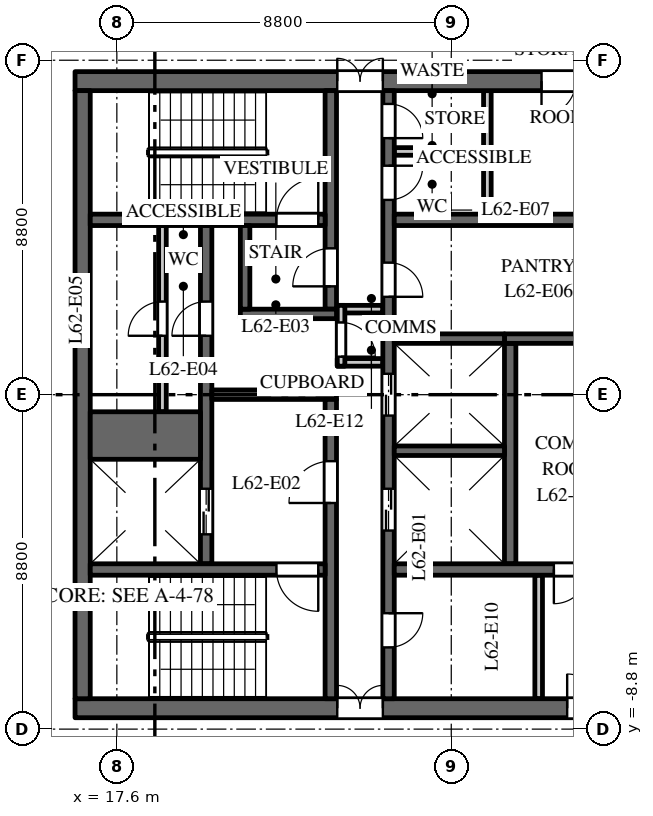
"""IFC4 building model, lengths in metres.
Left out: names, types, materials, properties, quantities, classifications, styles, units other than length and angle.
Written with IfcOpenShell. Run it as: python <this file> out.ifc"""

import sys

from ifc_helpers import new_model, si_unit, direction, frame, frame_2d, origin, place, context, subcontext, project, spatial, rectangle, extrude, element, fill, save


model = new_model("IFC4")
c1 = context("Model", 3, precision=1e-05, world=origin(), true_north=direction((0.0, 1.0)))
c2 = subcontext(c1, "Body", "Model", "MODEL_VIEW")
j1 = project(units=[si_unit("LENGTHUNIT", "METRE"), si_unit("PLANEANGLEUNIT", "RADIAN")], contexts=[c1])
p1 = place(None, origin())
s1 = spatial("IfcSite", under=j1, at=p1, CompositionType="ELEMENT")
p2 = place(p1, origin())
s2 = spatial("IfcBuilding", under=s1, at=p2, CompositionType="ELEMENT")
p3 = place(p2, frame((0.0, 0.0, 291.0)))
s3 = spatial("IfcBuildingStorey", under=s2, at=p3, CompositionType="ELEMENT", Elevation=291.0)
p4 = place(p3, frame((16.5, 8.25, 0.0), z_axis=(0.0, 0.0, 1.0), x_axis=(1.0, 0.0, 0.0)))
e1 = element("IfcWall", 1, at=p4, inside=s3, PredefinedType="SHEAR", context=c2, shape_type="SweptSolid", body=[
    extrude(rectangle(XDim=15.0, YDim=0.5, at=frame_2d((7.5, 0.0))), origin(), (0.0, 0.0, 1.0), 3.7),
])
p5 = place(p4, frame((6.9, 0.0, 0.0)))
e2 = element("IfcOpeningElement", 2, at=p5, cuts=e1, PredefinedType="OPENING", context=c2, shape_type="SweptSolid", body=[
    extrude(rectangle(XDim=1.2, YDim=2.1, at=frame_2d((0.6, 1.05))), frame((0.0, 0.26, 0.0), z_axis=(0.0, -1.0, 0.0), x_axis=(1.0, 0.0, 0.0)), (0.0, 0.0, 1.0), 0.52),
])
p6 = place(p4, frame((12.275, 0.0, 0.0)))
e3 = element("IfcOpeningElement", 3, at=p6, cuts=e1, PredefinedType="OPENING", context=c2, shape_type="SweptSolid", body=[
    extrude(rectangle(XDim=0.9, YDim=2.1, at=frame_2d((0.45, 1.05))), frame((0.0, 0.26, 0.0), z_axis=(0.0, -1.0, 0.0), x_axis=(1.0, 0.0, 0.0)), (0.0, 0.0, 1.0), 0.52),
])
p7 = place(p3, frame((16.5, -8.25, 0.0), z_axis=(0.0, 0.0, 1.0), x_axis=(1.0, 0.0, 0.0)))
e4 = element("IfcWall", 4, at=p7, inside=s3, PredefinedType="SHEAR", context=c2, shape_type="SweptSolid", body=[
    extrude(rectangle(XDim=15.0, YDim=0.5, at=frame_2d((7.5, 0.0))), origin(), (0.0, 0.0, 1.0), 3.7),
])
p8 = place(p7, frame((6.9, 0.0, 0.0)))
e5 = element("IfcOpeningElement", 5, at=p8, cuts=e4, PredefinedType="OPENING", context=c2, shape_type="SweptSolid", body=[
    extrude(rectangle(XDim=1.2, YDim=2.1, at=frame_2d((0.6, 1.05))), frame((0.0, 0.26, 0.0), z_axis=(0.0, -1.0, 0.0), x_axis=(1.0, 0.0, 0.0)), (0.0, 0.0, 1.0), 0.52),
])
p9 = place(p7, frame((12.95, 0.0, 0.0)))
e6 = element("IfcOpeningElement", 6, at=p9, cuts=e4, PredefinedType="OPENING", context=c2, shape_type="SweptSolid", body=[
    extrude(rectangle(XDim=0.9, YDim=2.1, at=frame_2d((0.45, 1.05))), frame((0.0, 0.26, 0.0), z_axis=(0.0, -1.0, 0.0), x_axis=(1.0, 0.0, 0.0)), (0.0, 0.0, 1.0), 0.52),
])
p10 = place(p3, frame((18.8, -0.45, 0.0), z_axis=(0.0, 0.0, 1.0), x_axis=(0.0, 1.0, 0.0)))
e7 = element("IfcWall", 7, at=p10, inside=s3, PredefinedType="PARTITIONING", context=c2, shape_type="SweptSolid", body=[
    extrude(rectangle(XDim=4.9, YDim=0.2, at=frame_2d((2.45, 0.0))), origin(), (0.0, 0.0, 1.0), 3.7),
])
p11 = place(p10, frame((2.0, 0.0, 0.0)))
e8 = element("IfcOpeningElement", 8, at=p11, cuts=e7, PredefinedType="OPENING", context=c2, shape_type="SweptSolid", body=[
    extrude(rectangle(XDim=0.9, YDim=2.1, at=frame_2d((0.45, 1.05))), frame((0.0, 0.11, 0.0), z_axis=(0.0, -1.0, 0.0), x_axis=(1.0, 0.0, 0.0)), (0.0, 0.0, 1.0), 0.22),
])
p12 = place(p3, frame((27.95, -4.45, 0.0), z_axis=(0.0, 0.0, 1.0), x_axis=(0.0, 1.0, 0.0)))
e9 = element("IfcWall", 9, at=p12, inside=s3, PredefinedType="SHEAR", context=c2, shape_type="SweptSolid", body=[
    extrude(rectangle(XDim=5.8, YDim=0.3, at=frame_2d((2.9, 0.0))), origin(), (0.0, 0.0, 1.0), 3.7),
])
p13 = place(p3, frame((27.8, 1.475, 0.0), z_axis=(0.0, 0.0, 1.0), x_axis=(1.0, 0.0, 0.0)))
e10 = element("IfcWall", 10, at=p13, inside=s3, PredefinedType="SHEAR", context=c2, shape_type="SweptSolid", body=[
    extrude(rectangle(XDim=3.2, YDim=0.25, at=frame_2d((1.6, 0.0))), origin(), (0.0, 0.0, 1.0), 3.7),
])
p14 = place(p3, frame((19.95, -4.45, 0.0), z_axis=(0.0, 0.0, 1.0), x_axis=(0.0, 1.0, 0.0)))
e11 = element("IfcWall", 11, at=p14, inside=s3, PredefinedType="SHEAR", context=c2, shape_type="SweptSolid", body=[
    extrude(rectangle(XDim=8.9, YDim=0.3, at=frame_2d((4.45, 0.0))), origin(), (0.0, 0.0, 1.0), 3.7),
])
p15 = place(p14, frame((0.775, 0.0, 0.0)))
e12 = element("IfcOpeningElement", 12, at=p15, cuts=e11, PredefinedType="OPENING", context=c2, shape_type="SweptSolid", body=[
    extrude(rectangle(XDim=1.2, YDim=2.1, at=frame_2d((0.6, 1.05))), frame((0.0, 0.16, 0.0), z_axis=(0.0, -1.0, 0.0), x_axis=(1.0, 0.0, 0.0)), (0.0, 0.0, 1.0), 0.32),
])
p16 = place(p14, frame((6.0, 0.0, 0.0)))
e13 = element("IfcOpeningElement", 13, at=p16, cuts=e11, PredefinedType="OPENING", context=c2, shape_type="SweptSolid", body=[
    extrude(rectangle(XDim=0.9, YDim=2.1, at=frame_2d((0.45, 1.05))), frame((0.0, 0.16, 0.0), z_axis=(0.0, -1.0, 0.0), x_axis=(1.0, 0.0, 0.0)), (0.0, 0.0, 1.0), 0.32),
])
p17 = place(p3, frame((24.75, -8.0, 0.0), z_axis=(0.0, 0.0, 1.0), x_axis=(0.0, 1.0, 0.0)))
e14 = element("IfcWall", 14, at=p17, inside=s3, PredefinedType="SHEAR", context=c2, shape_type="SweptSolid", body=[
    extrude(rectangle(XDim=16.0, YDim=0.3, at=frame_2d((8.0, 0.0))), origin(), (0.0, 0.0, 1.0), 3.7),
])
p18 = place(p17, frame((4.425, 0.0, 0.0)))
e15 = element("IfcOpeningElement", 15, at=p18, cuts=e14, PredefinedType="OPENING", context=c2, shape_type="SweptSolid", body=[
    extrude(rectangle(XDim=1.1, YDim=2.1, at=frame_2d((0.55, 1.05))), frame((0.0, 0.16, 0.0), z_axis=(0.0, -1.0, 0.0), x_axis=(1.0, 0.0, 0.0)), (0.0, 0.0, 1.0), 0.32),
])
p19 = place(p17, frame((7.45, 0.0, 0.0)))
e16 = element("IfcOpeningElement", 16, at=p19, cuts=e14, PredefinedType="OPENING", context=c2, shape_type="SweptSolid", body=[
    extrude(rectangle(XDim=1.1, YDim=2.1, at=frame_2d((0.55, 1.05))), frame((0.0, 0.16, 0.0), z_axis=(0.0, -1.0, 0.0), x_axis=(1.0, 0.0, 0.0)), (0.0, 0.0, 1.0), 0.32),
])
p20 = place(p17, frame((10.575, 0.0, 0.0)))
e17 = element("IfcOpeningElement", 17, at=p20, cuts=e14, PredefinedType="OPENING", context=c2, shape_type="SweptSolid", body=[
    extrude(rectangle(XDim=0.9, YDim=2.1, at=frame_2d((0.45, 1.05))), frame((0.0, 0.16, 0.0), z_axis=(0.0, -1.0, 0.0), x_axis=(1.0, 0.0, 0.0)), (0.0, 0.0, 1.0), 0.32),
])
p21 = place(p17, frame((13.125, 0.0, 0.0)))
e18 = element("IfcOpeningElement", 18, at=p21, cuts=e14, PredefinedType="OPENING", context=c2, shape_type="SweptSolid", body=[
    extrude(rectangle(XDim=0.9, YDim=2.1, at=frame_2d((0.45, 1.05))), frame((0.0, 0.16, 0.0), z_axis=(0.0, -1.0, 0.0), x_axis=(1.0, 0.0, 0.0)), (0.0, 0.0, 1.0), 0.32),
])
p22 = place(p17, frame((14.75, 0.0, 0.0)))
e19 = element("IfcOpeningElement", 19, at=p22, cuts=e14, PredefinedType="OPENING", context=c2, shape_type="SweptSolid", body=[
    extrude(rectangle(XDim=0.9, YDim=2.1, at=frame_2d((0.45, 1.05))), frame((0.0, 0.16, 0.0), z_axis=(0.0, -1.0, 0.0), x_axis=(1.0, 0.0, 0.0)), (0.0, 0.0, 1.0), 0.32),
])
p23 = place(p17, frame((1.35, 0.0, 0.0)))
e20 = element("IfcOpeningElement", 20, at=p23, cuts=e14, PredefinedType="OPENING", context=c2, shape_type="SweptSolid", body=[
    extrude(rectangle(XDim=0.9, YDim=2.1, at=frame_2d((0.45, 1.05))), frame((0.0, 0.16, 0.0), z_axis=(0.0, -1.0, 0.0), x_axis=(1.0, 0.0, 0.0)), (0.0, 0.0, 1.0), 0.32),
])
p24 = place(p3, frame((20.1, 0.0, 0.0), z_axis=(0.0, 0.0, 1.0), x_axis=(1.0, 0.0, 0.0)))
e21 = element("IfcWall", 21, at=p24, inside=s3, PredefinedType="SHEAR", context=c2, shape_type="SweptSolid", body=[
    extrude(rectangle(XDim=3.28, YDim=0.25, at=frame_2d((1.64, 0.0))), origin(), (0.0, 0.0, 1.0), 3.7),
])
p25 = place(p3, frame((16.7, -8.0, 0.0), z_axis=(0.0, 0.0, 1.0), x_axis=(0.0, 1.0, 0.0)))
e22 = element("IfcWall", 22, at=p25, inside=s3, PredefinedType="SHEAR", context=c2, shape_type="SweptSolid", body=[
    extrude(rectangle(XDim=16.0, YDim=0.4, at=frame_2d((8.0, 0.0))), origin(), (0.0, 0.0, 1.0), 3.7),
])
for number, where, z_axis, x_axis in (
    (23, (23.4, 0.85, 0.0), (0.0, 0.0, 1.0), (1.0, 0.0, 0.0)),
    (24, (23.4, 2.25, 0.0), (0.0, 0.0, 1.0), (1.0, 0.0, 0.0)),
):
    element("IfcWall", number, at=place(p3, frame(where, z_axis=z_axis, x_axis=x_axis)), inside=s3, PredefinedType="PARTITIONING", context=c2, shape_type="SweptSolid", body=[
        extrude(rectangle(XDim=1.2, YDim=0.2, at=frame_2d((0.6, 0.0))), origin(), (0.0, 0.0, 1.0), 3.7),
    ])
p26 = place(p3, frame((23.5, 0.75, 0.0), z_axis=(0.0, 0.0, 1.0), x_axis=(0.0, 1.0, 0.0)))
e25 = element("IfcWall", 25, at=p26, inside=s3, PredefinedType="PARTITIONING", context=c2, shape_type="SweptSolid", body=[
    extrude(rectangle(XDim=1.6, YDim=0.2, at=frame_2d((0.8, 0.0))), origin(), (0.0, 0.0, 1.0), 3.7),
])
p27 = place(p26, frame((0.25, 0.0, 0.0)))
e26 = element("IfcOpeningElement", 26, at=p27, cuts=e25, PredefinedType="OPENING", context=c2, shape_type="SweptSolid", body=[
    extrude(rectangle(XDim=0.9, YDim=2.1, at=frame_2d((0.45, 1.05))), frame((0.0, 0.11, 0.0), z_axis=(0.0, -1.0, 0.0), x_axis=(1.0, 0.0, 0.0)), (0.0, 0.0, 1.0), 0.22),
])
p28 = place(p3, frame((24.9, 4.6, 0.0), z_axis=(0.0, 0.0, 1.0), x_axis=(1.0, 0.0, 0.0)))
e27 = element("IfcWall", 27, at=p28, inside=s3, PredefinedType="SHEAR", context=c2, shape_type="SweptSolid", body=[
    extrude(rectangle(XDim=6.1, YDim=0.3, at=frame_2d((3.05, 0.0))), origin(), (0.0, 0.0, 1.0), 3.7),
])
for number, where, z_axis, x_axis in (
    (28, (27.35, 4.75, 0.0), (0.0, 0.0, 1.0), (0.0, 1.0, 0.0)),
    (29, (28.7, -8.0, 0.0), (0.0, 0.0, 1.0), (0.0, 1.0, 0.0)),
):
    element("IfcWall", number, at=place(p3, frame(where, z_axis=z_axis, x_axis=x_axis)), inside=s3, PredefinedType="PARTITIONING", context=c2, shape_type="SweptSolid", body=[
        extrude(rectangle(XDim=3.25, YDim=0.2, at=frame_2d((1.625, 0.0))), origin(), (0.0, 0.0, 1.0), 3.7),
    ])
p29 = place(p3, frame((24.9, 6.4, 0.0), z_axis=(0.0, 0.0, 1.0), x_axis=(1.0, 0.0, 0.0)))
e30 = element("IfcWall", 30, at=p29, inside=s3, PredefinedType="PARTITIONING", context=c2, shape_type="SweptSolid", body=[
    extrude(rectangle(XDim=2.35, YDim=0.2, at=frame_2d((1.175, 0.0))), origin(), (0.0, 0.0, 1.0), 3.7),
])
p30 = place(p3, frame((24.9, -4.6, 0.0), z_axis=(0.0, 0.0, 1.0), x_axis=(1.0, 0.0, 0.0)))
e31 = element("IfcWall", 31, at=p30, inside=s3, PredefinedType="SHEAR", context=c2, shape_type="SweptSolid", body=[
    extrude(rectangle(XDim=6.1, YDim=0.3, at=frame_2d((3.05, 0.0))), origin(), (0.0, 0.0, 1.0), 3.7),
])
p31 = place(p30, frame((4.2, 0.0, 0.0)))
e32 = element("IfcOpeningElement", 32, at=p31, cuts=e31, PredefinedType="OPENING", context=c2, shape_type="SweptSolid", body=[
    extrude(rectangle(XDim=0.9, YDim=2.1, at=frame_2d((0.45, 1.05))), frame((0.0, 0.16, 0.0), z_axis=(0.0, -1.0, 0.0), x_axis=(1.0, 0.0, 0.0)), (0.0, 0.0, 1.0), 0.32),
])
p32 = place(p3, frame((16.9, -1.075, 0.0), z_axis=(0.0, 0.0, 1.0), x_axis=(1.0, 0.0, 0.0)))
e33 = element("IfcWall", 33, at=p32, inside=s3, PredefinedType="SHEAR", context=c2, shape_type="SweptSolid", body=[
    extrude(rectangle(XDim=2.9, YDim=1.25, at=frame_2d((1.45, 0.0))), origin(), (0.0, 0.0, 1.0), 3.7),
])
for number, where, z_axis, x_axis in (
    (34, (24.9, -1.475, 0.0), (0.0, 0.0, 1.0), (1.0, 0.0, 0.0)),
    (35, (24.9, 1.475, 0.0), (0.0, 0.0, 1.0), (1.0, 0.0, 0.0)),
):
    element("IfcWall", number, at=place(p3, frame(where, z_axis=z_axis, x_axis=x_axis)), inside=s3, PredefinedType="SHEAR", context=c2, shape_type="SweptSolid", body=[
        extrude(rectangle(XDim=2.9, YDim=0.25, at=frame_2d((1.45, 0.0))), origin(), (0.0, 0.0, 1.0), 3.7),
    ])
p33 = place(p3, frame((23.23, 2.25, 0.0), z_axis=(0.0, 0.0, 1.0), x_axis=(0.0, 1.0, 0.0)))
e36 = element("IfcWall", 36, at=p33, inside=s3, PredefinedType="SHEAR", context=c2, shape_type="SweptSolid", body=[
    extrude(rectangle(XDim=5.75, YDim=0.3, at=frame_2d((2.875, 0.0))), origin(), (0.0, 0.0, 1.0), 3.7),
])
p34 = place(p33, frame((0.6, 0.0, 0.0)))
e37 = element("IfcOpeningElement", 37, at=p34, cuts=e36, PredefinedType="OPENING", context=c2, shape_type="SweptSolid", body=[
    extrude(rectangle(XDim=1.0, YDim=2.1, at=frame_2d((0.5, 1.05))), frame((0.0, 0.16, 0.0), z_axis=(0.0, -1.0, 0.0), x_axis=(1.0, 0.0, 0.0)), (0.0, 0.0, 1.0), 0.32),
])
p35 = place(p3, frame((23.23, -8.0, 0.0), z_axis=(0.0, 0.0, 1.0), x_axis=(0.0, 1.0, 0.0)))
e38 = element("IfcWall", 38, at=p35, inside=s3, PredefinedType="SHEAR", context=c2, shape_type="SweptSolid", body=[
    extrude(rectangle(XDim=7.875, YDim=0.3, at=frame_2d((3.938, 0.0))), origin(), (0.0, 0.0, 1.0), 3.7),
])
p36 = place(p35, frame((5.15, 0.0, 0.0)))
e39 = element("IfcOpeningElement", 39, at=p36, cuts=e38, PredefinedType="OPENING", context=c2, shape_type="SweptSolid", body=[
    extrude(rectangle(XDim=1.1, YDim=2.1, at=frame_2d((0.55, 1.05))), frame((0.0, 0.16, 0.0), z_axis=(0.0, -1.0, 0.0), x_axis=(1.0, 0.0, 0.0)), (0.0, 0.0, 1.0), 0.32),
])
p37 = place(p3, frame((16.9, 4.6, 0.0), z_axis=(0.0, 0.0, 1.0), x_axis=(1.0, 0.0, 0.0)))
e40 = element("IfcWall", 40, at=p37, inside=s3, PredefinedType="SHEAR", context=c2, shape_type="SweptSolid", body=[
    extrude(rectangle(XDim=6.18, YDim=0.3, at=frame_2d((3.09, 0.0))), origin(), (0.0, 0.0, 1.0), 3.7),
])
p38 = place(p37, frame((4.9, 0.0, 0.0)))
e41 = element("IfcOpeningElement", 41, at=p38, cuts=e40, PredefinedType="OPENING", context=c2, shape_type="SweptSolid", body=[
    extrude(rectangle(XDim=1.1, YDim=2.1, at=frame_2d((0.55, 1.05))), frame((0.0, 0.16, 0.0), z_axis=(0.0, -1.0, 0.0), x_axis=(1.0, 0.0, 0.0)), (0.0, 0.0, 1.0), 0.32),
])
p39 = place(p3, frame((16.9, -4.6, 0.0), z_axis=(0.0, 0.0, 1.0), x_axis=(1.0, 0.0, 0.0)))
e42 = element("IfcWall", 42, at=p39, inside=s3, PredefinedType="SHEAR", context=c2, shape_type="SweptSolid", body=[
    extrude(rectangle(XDim=6.18, YDim=0.3, at=frame_2d((3.09, 0.0))), origin(), (0.0, 0.0, 1.0), 3.7),
])
p40 = place(p39, frame((4.9, 0.0, 0.0)))
e43 = element("IfcOpeningElement", 43, at=p40, cuts=e42, PredefinedType="OPENING", context=c2, shape_type="SweptSolid", body=[
    extrude(rectangle(XDim=1.1, YDim=2.1, at=frame_2d((0.55, 1.05))), frame((0.0, 0.16, 0.0), z_axis=(0.0, -1.0, 0.0), x_axis=(1.0, 0.0, 0.0)), (0.0, 0.0, 1.0), 0.32),
])
p41 = place(p3, frame((20.85, 2.125, 0.0), z_axis=(0.0, 0.0, 1.0), x_axis=(1.0, 0.0, 0.0)))
e44 = element("IfcWall", 44, at=p41, inside=s3, PredefinedType="SHEAR", context=c2, shape_type="SweptSolid", body=[
    extrude(rectangle(XDim=2.53, YDim=0.25, at=frame_2d((1.265, 0.0))), origin(), (0.0, 0.0, 1.0), 3.7),
])
p42 = place(p3, frame((20.975, 2.25, 0.0), z_axis=(0.0, 0.0, 1.0), x_axis=(0.0, 1.0, 0.0)))
e45 = element("IfcWall", 45, at=p42, inside=s3, PredefinedType="SHEAR", context=c2, shape_type="SweptSolid", body=[
    extrude(rectangle(XDim=2.2, YDim=0.25, at=frame_2d((1.1, 0.0))), origin(), (0.0, 0.0, 1.0), 3.7),
])
p43 = place(p15, origin())
e46 = element("IfcDoor", 46, at=p43, inside=s3, OperationType="DOUBLE_DOOR_SLIDING", PredefinedType="DOOR", context=c2, shape_type="SweptSolid", body=[
    extrude(rectangle(XDim=1.2, YDim=2.1, at=frame_2d((0.6, 1.05))), frame((0.0, 0.025, 0.0), z_axis=(0.0, -1.0, 0.0), x_axis=(1.0, 0.0, 0.0)), (0.0, 0.0, 1.0), 0.05),
])
fill(e12, e46)
p44 = place(p18, origin())
e47 = element("IfcDoor", 47, at=p44, inside=s3, OperationType="DOUBLE_DOOR_SLIDING", PredefinedType="DOOR", context=c2, shape_type="SweptSolid", body=[
    extrude(rectangle(XDim=1.1, YDim=2.1, at=frame_2d((0.55, 1.05))), frame((0.0, 0.025, 0.0), z_axis=(0.0, -1.0, 0.0), x_axis=(1.0, 0.0, 0.0)), (0.0, 0.0, 1.0), 0.05),
])
fill(e15, e47)
p45 = place(p19, origin())
e48 = element("IfcDoor", 48, at=p45, inside=s3, OperationType="DOUBLE_DOOR_SLIDING", PredefinedType="DOOR", context=c2, shape_type="SweptSolid", body=[
    extrude(rectangle(XDim=1.1, YDim=2.1, at=frame_2d((0.55, 1.05))), frame((0.0, 0.025, 0.0), z_axis=(0.0, -1.0, 0.0), x_axis=(1.0, 0.0, 0.0)), (0.0, 0.0, 1.0), 0.05),
])
fill(e16, e48)
p46 = place(p38, origin())
e49 = element("IfcDoor", 49, at=p46, inside=s3, OperationType="SINGLE_SWING_LEFT", PredefinedType="DOOR", context=c2, shape_type="SweptSolid", body=[
    extrude(rectangle(XDim=1.1, YDim=2.1, at=frame_2d((0.55, 1.05))), frame((0.0, 0.025, 0.0), z_axis=(0.0, -1.0, 0.0), x_axis=(1.0, 0.0, 0.0)), (0.0, 0.0, 1.0), 0.05),
])
fill(e41, e49)
p47 = place(p40, origin())
e50 = element("IfcDoor", 50, at=p47, inside=s3, OperationType="SINGLE_SWING_RIGHT", PredefinedType="DOOR", context=c2, shape_type="SweptSolid", body=[
    extrude(rectangle(XDim=1.1, YDim=2.1, at=frame_2d((0.55, 1.05))), frame((0.0, 0.025, 0.0), z_axis=(0.0, -1.0, 0.0), x_axis=(1.0, 0.0, 0.0)), (0.0, 0.0, 1.0), 0.05),
])
fill(e43, e50)
p48 = place(p36, origin())
e51 = element("IfcDoor", 51, at=p48, inside=s3, OperationType="SINGLE_SWING_RIGHT", PredefinedType="DOOR", context=c2, shape_type="SweptSolid", body=[
    extrude(rectangle(XDim=1.1, YDim=2.1, at=frame_2d((0.55, 1.05))), frame((0.0, 0.025, 0.0), z_axis=(0.0, -1.0, 0.0), x_axis=(1.0, 0.0, 0.0)), (0.0, 0.0, 1.0), 0.05),
])
fill(e39, e51)
p49 = place(p34, origin())
e52 = element("IfcDoor", 52, at=p49, inside=s3, OperationType="SINGLE_SWING_RIGHT", PredefinedType="DOOR", context=c2, shape_type="SweptSolid", body=[
    extrude(rectangle(XDim=1.0, YDim=2.1, at=frame_2d((0.5, 1.05))), frame((0.0, 0.025, 0.0), z_axis=(0.0, -1.0, 0.0), x_axis=(1.0, 0.0, 0.0)), (0.0, 0.0, 1.0), 0.05),
])
fill(e37, e52)
p50 = place(p5, origin())
e53 = element("IfcDoor", 53, at=p50, inside=s3, OperationType="DOUBLE_DOOR_DOUBLE_SWING", PredefinedType="DOOR", context=c2, shape_type="SweptSolid", body=[
    extrude(rectangle(XDim=1.2, YDim=2.1, at=frame_2d((0.6, 1.05))), frame((0.0, 0.025, 0.0), z_axis=(0.0, -1.0, 0.0), x_axis=(1.0, 0.0, 0.0)), (0.0, 0.0, 1.0), 0.05),
])
fill(e2, e53)
p51 = place(p8, origin())
e54 = element("IfcDoor", 54, at=p51, inside=s3, OperationType="DOUBLE_DOOR_DOUBLE_SWING", PredefinedType="DOOR", context=c2, shape_type="SweptSolid", body=[
    extrude(rectangle(XDim=1.2, YDim=2.1, at=frame_2d((0.6, 1.05))), frame((0.0, 0.025, 0.0), z_axis=(0.0, -1.0, 0.0), x_axis=(1.0, 0.0, 0.0)), (0.0, 0.0, 1.0), 0.05),
])
fill(e5, e54)
p52 = place(p16, origin())
e55 = element("IfcDoor", 55, at=p52, inside=s3, OperationType="SINGLE_SWING_RIGHT", PredefinedType="DOOR", context=c2, shape_type="SweptSolid", body=[
    extrude(rectangle(XDim=0.9, YDim=2.1, at=frame_2d((0.45, 1.05))), frame((0.0, 0.025, 0.0), z_axis=(0.0, -1.0, 0.0), x_axis=(1.0, 0.0, 0.0)), (0.0, 0.0, 1.0), 0.05),
])
fill(e13, e55)
p53 = place(p11, origin())
e56 = element("IfcDoor", 56, at=p53, inside=s3, OperationType="SINGLE_SWING_RIGHT", PredefinedType="DOOR", context=c2, shape_type="SweptSolid", body=[
    extrude(rectangle(XDim=0.9, YDim=2.1, at=frame_2d((0.45, 1.05))), frame((0.0, 0.025, 0.0), z_axis=(0.0, -1.0, 0.0), x_axis=(1.0, 0.0, 0.0)), (0.0, 0.0, 1.0), 0.05),
])
fill(e8, e56)
p54 = place(p20, origin())
e57 = element("IfcDoor", 57, at=p54, inside=s3, OperationType="SINGLE_SWING_LEFT", PredefinedType="DOOR", context=c2, shape_type="SweptSolid", body=[
    extrude(rectangle(XDim=0.9, YDim=2.1, at=frame_2d((0.45, 1.05))), frame((0.0, 0.025, 0.0), z_axis=(0.0, -1.0, 0.0), x_axis=(1.0, 0.0, 0.0)), (0.0, 0.0, 1.0), 0.05),
])
fill(e17, e57)
p55 = place(p21, origin())
e58 = element("IfcDoor", 58, at=p55, inside=s3, OperationType="SINGLE_SWING_RIGHT", PredefinedType="DOOR", context=c2, shape_type="SweptSolid", body=[
    extrude(rectangle(XDim=0.9, YDim=2.1, at=frame_2d((0.45, 1.05))), frame((0.0, 0.025, 0.0), z_axis=(0.0, -1.0, 0.0), x_axis=(1.0, 0.0, 0.0)), (0.0, 0.0, 1.0), 0.05),
])
fill(e18, e58)
p56 = place(p22, origin())
e59 = element("IfcDoor", 59, at=p56, inside=s3, OperationType="SINGLE_SWING_LEFT", PredefinedType="DOOR", context=c2, shape_type="SweptSolid", body=[
    extrude(rectangle(XDim=0.9, YDim=2.1, at=frame_2d((0.45, 1.05))), frame((0.0, 0.025, 0.0), z_axis=(0.0, -1.0, 0.0), x_axis=(1.0, 0.0, 0.0)), (0.0, 0.0, 1.0), 0.05),
])
fill(e19, e59)
p57 = place(p6, origin())
e60 = element("IfcDoor", 60, at=p57, inside=s3, OperationType="SINGLE_SWING_LEFT", PredefinedType="DOOR", context=c2, shape_type="SweptSolid", body=[
    extrude(rectangle(XDim=0.9, YDim=2.1, at=frame_2d((0.45, 1.05))), frame((0.0, 0.025, 0.0), z_axis=(0.0, -1.0, 0.0), x_axis=(1.0, 0.0, 0.0)), (0.0, 0.0, 1.0), 0.05),
])
fill(e3, e60)
p58 = place(p23, origin())
e61 = element("IfcDoor", 61, at=p58, inside=s3, OperationType="SINGLE_SWING_RIGHT", PredefinedType="DOOR", context=c2, shape_type="SweptSolid", body=[
    extrude(rectangle(XDim=0.9, YDim=2.1, at=frame_2d((0.45, 1.05))), frame((0.0, 0.025, 0.0), z_axis=(0.0, -1.0, 0.0), x_axis=(1.0, 0.0, 0.0)), (0.0, 0.0, 1.0), 0.05),
])
fill(e20, e61)
p59 = place(p9, origin())
e62 = element("IfcDoor", 62, at=p59, inside=s3, OperationType="SINGLE_SWING_RIGHT", PredefinedType="DOOR", context=c2, shape_type="SweptSolid", body=[
    extrude(rectangle(XDim=0.9, YDim=2.1, at=frame_2d((0.45, 1.05))), frame((0.0, 0.025, 0.0), z_axis=(0.0, -1.0, 0.0), x_axis=(1.0, 0.0, 0.0)), (0.0, 0.0, 1.0), 0.05),
])
fill(e6, e62)
p60 = place(p27, origin())
e63 = element("IfcDoor", 63, at=p60, inside=s3, OperationType="SINGLE_SWING_LEFT", PredefinedType="DOOR", context=c2, shape_type="SweptSolid", body=[
    extrude(rectangle(XDim=0.9, YDim=2.1, at=frame_2d((0.45, 1.05))), frame((0.0, 0.025, 0.0), z_axis=(0.0, -1.0, 0.0), x_axis=(1.0, 0.0, 0.0)), (0.0, 0.0, 1.0), 0.05),
])
fill(e26, e63)
p61 = place(p31, origin())
e64 = element("IfcDoor", 64, at=p61, inside=s3, OperationType="SINGLE_SWING_LEFT", PredefinedType="DOOR", context=c2, shape_type="SweptSolid", body=[
    extrude(rectangle(XDim=0.9, YDim=2.1, at=frame_2d((0.45, 1.05))), frame((0.0, 0.025, 0.0), z_axis=(0.0, -1.0, 0.0), x_axis=(1.0, 0.0, 0.0)), (0.0, 0.0, 1.0), 0.05),
])
fill(e32, e64)
save(model, sys.argv[1])
